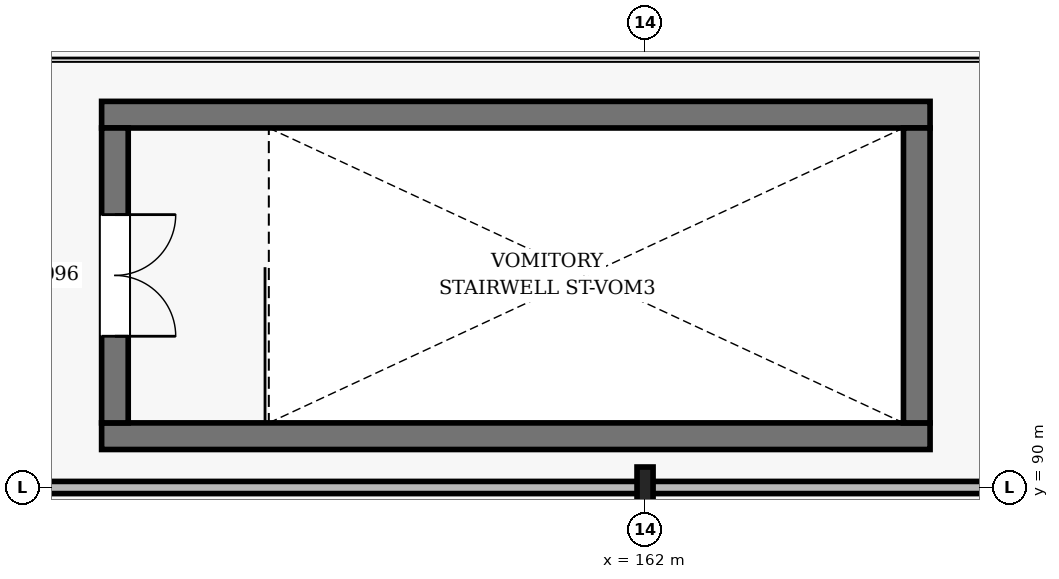
"""IFC4 building model, lengths in metres.
Left out: names, types, materials, properties, quantities, classifications, styles, units other than length and angle.
Written with IfcOpenShell. Run it as: python <this file> out.ifc"""

import sys

from ifc_helpers import new_model, si_unit, direction, frame, frame_2d, origin, origin_2d, place, context, subcontext, project, spatial, rectangle, i_section, extrude, element, fill, save


model = new_model("IFC4")
c1 = context("Model", 3, precision=1e-05, world=origin(), true_north=direction((0.0, 1.0)))
c2 = subcontext(c1, "Body", "Model", "MODEL_VIEW")
j1 = project(units=[si_unit("LENGTHUNIT", "METRE"), si_unit("PLANEANGLEUNIT", "RADIAN")], contexts=[c1])
p1 = place(None, origin())
s1 = spatial("IfcSite", under=j1, at=p1, CompositionType="ELEMENT")
p2 = place(p1, origin())
s2 = spatial("IfcBuilding", under=s1, at=p2, CompositionType="ELEMENT")
p3 = place(p2, frame((0.0, 0.0, 5.4)))
s3 = spatial("IfcBuildingStorey", under=s2, at=p3, CompositionType="ELEMENT", Elevation=5.4)
p4 = place(p3, frame((162.0, 90.0, 0.0), z_axis=(0.0, 0.0, 1.0), x_axis=(1.0, 0.0, 0.0)))
e1 = element("IfcColumn", 1, at=p4, inside=s3, PredefinedType="COLUMN", context=c2, shape_type="SweptSolid", body=[
    extrude(i_section(OverallWidth=0.211, OverallDepth=0.539, WebThickness=0.012, FlangeThickness=0.019, FilletRadius=0.014, at=origin_2d()), origin(), (0.0, 0.0, 1.0), 5.4),
])
for number, where, z_axis, x_axis in (
    (2, (154.85, 90.675, 0.0), (0.0, 0.0, 1.0), (1.0, 0.0, 0.0)),
    (3, (165.75, 94.905, 0.0), (0.0, 0.0, 1.0), (-1.0, 0.0, 0.0)),
):
    element("IfcWall", number, at=place(p3, frame(where, z_axis=z_axis, x_axis=x_axis)), inside=s3, PredefinedType="SHEAR", context=c2, shape_type="SweptSolid", body=[
        extrude(rectangle(XDim=10.9, YDim=0.35, at=frame_2d((5.45, 0.0))), origin(), (0.0, 0.0, 1.0), 5.4),
    ])
p5 = place(p3, frame((155.025, 94.73, 0.0), z_axis=(0.0, 0.0, 1.0), x_axis=(0.0, -1.0, 0.0)))
e4 = element("IfcWall", 4, at=p5, inside=s3, PredefinedType="SHEAR", context=c2, shape_type="SweptSolid", body=[
    extrude(rectangle(XDim=3.88, YDim=0.35, at=frame_2d((1.94, 0.0))), origin(), (0.0, 0.0, 1.0), 5.4),
])
p6 = place(p5, frame((1.14, 0.0, 0.0)))
e5 = element("IfcOpeningElement", 5, at=p6, cuts=e4, PredefinedType="OPENING", context=c2, shape_type="SweptSolid", body=[
    extrude(rectangle(XDim=1.6, YDim=2.2, at=frame_2d((0.8, 1.1))), frame((0.0, 0.185, 0.0), z_axis=(0.0, -1.0, 0.0), x_axis=(1.0, 0.0, 0.0)), (0.0, 0.0, 1.0), 0.37),
])
p7 = place(p3, frame((165.575, 90.85, 0.0), z_axis=(0.0, 0.0, 1.0), x_axis=(0.0, 1.0, 0.0)))
e6 = element("IfcWall", 6, at=p7, inside=s3, PredefinedType="SHEAR", context=c2, shape_type="SweptSolid", body=[
    extrude(rectangle(XDim=3.88, YDim=0.35, at=frame_2d((1.94, 0.0))), origin(), (0.0, 0.0, 1.0), 5.4),
])
p8 = place(p3, frame((144.177, 90.0, 0.0), z_axis=(0.0, 0.0, 1.0), x_axis=(1.0, 0.0, 0.0)))
e7 = element("IfcWall", 7, at=p8, inside=s3, PredefinedType="PARTITIONING", context=c2, shape_type="SweptSolid", body=[
    extrude(rectangle(XDim=47.613, YDim=0.16, at=frame_2d((23.807, 0.0))), origin(), (0.0, 0.0, 1.0), 4.392),
])
p9 = place(p6, origin())
e8 = element("IfcDoor", 8, at=p9, inside=s3, OperationType="DOUBLE_DOOR_SINGLE_SWING", PredefinedType="DOOR", context=c2, shape_type="SweptSolid", body=[
    extrude(rectangle(XDim=1.6, YDim=2.2, at=frame_2d((0.8, 1.1))), frame((0.0, 0.025, 0.0), z_axis=(0.0, -1.0, 0.0), x_axis=(1.0, 0.0, 0.0)), (0.0, 0.0, 1.0), 0.05),
])
fill(e5, e8)
save(model, sys.argv[1])
